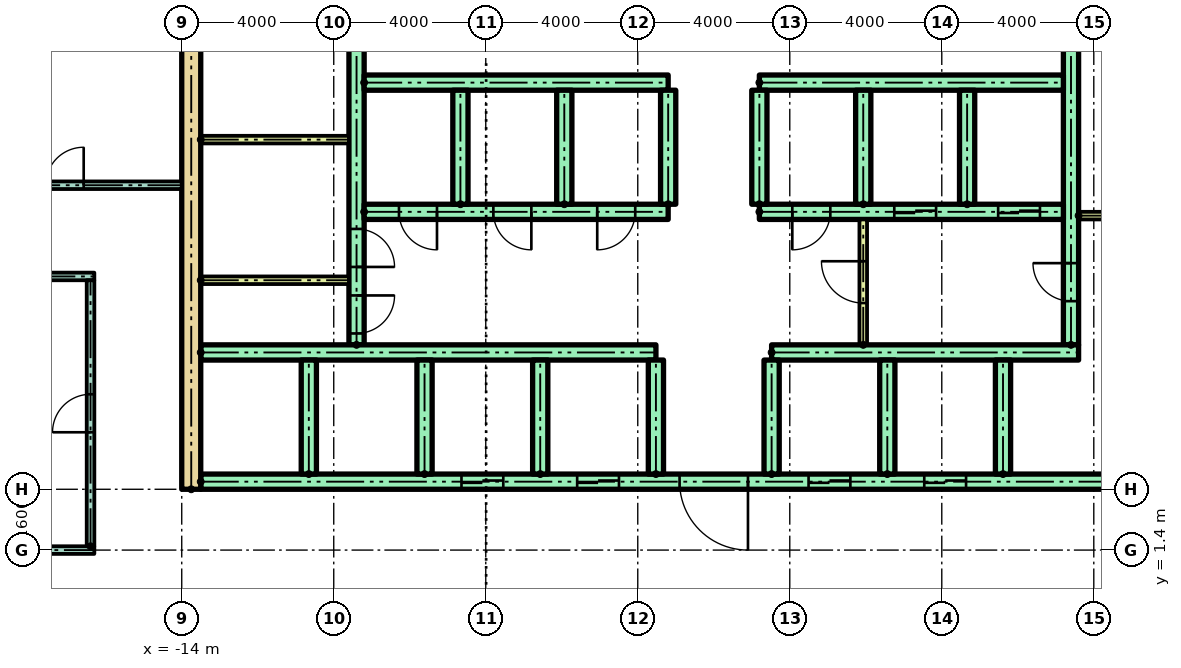
"""IFC4 building model, lengths in metres.
Left out: names, types, materials, properties, quantities, classifications, styles, units other than length and angle.
Written with IfcOpenShell. Run it as: python <this file> out.ifc"""

import sys

from ifc_helpers import new_model, si_unit, direction, frame, frame_2d, origin, place, context, subcontext, project, spatial, rectangle, extrude, element, fill, save


model = new_model("IFC4")
c1 = context("Model", 3, precision=1e-05, world=origin(), true_north=direction((0.0, 1.0)))
c2 = subcontext(c1, "Body", "Model", "MODEL_VIEW")
j1 = project(units=[si_unit("LENGTHUNIT", "METRE"), si_unit("PLANEANGLEUNIT", "RADIAN")], contexts=[c1])
p1 = place(None, origin())
s1 = spatial("IfcSite", under=j1, at=p1, CompositionType="ELEMENT")
p2 = place(p1, origin())
s2 = spatial("IfcBuilding", under=s1, at=p2, CompositionType="ELEMENT")
p3 = place(p2, frame((0.0, 0.0, 18.0)))
s3 = spatial("IfcBuildingStorey", under=s2, at=p3, CompositionType="ELEMENT", Elevation=18.0)
p4 = place(p3, frame((-13.75, 3.0, 0.0), z_axis=(0.0, 0.0, 1.0), x_axis=(0.0, 1.0, 0.0)))
e1 = element("IfcWall", 1, at=p4, inside=s3, PredefinedType="SHEAR", context=c2, shape_type="SweptSolid", body=[
    extrude(rectangle(XDim=17.0, YDim=0.5, at=frame_2d((8.5, 0.0))), origin(), (0.0, 0.0, 1.0), 3.7),
])
p5 = place(p3, frame((-9.4, 6.8, 0.0), z_axis=(0.0, 0.0, 1.0), x_axis=(0.0, 1.0, 0.0)))
e2 = element("IfcWall", 2, at=p5, inside=s3, PredefinedType="SHEAR", context=c2, shape_type="SweptSolid", body=[
    extrude(rectangle(XDim=12.7, YDim=0.4, at=frame_2d((6.35, 0.0))), origin(), (0.0, 0.0, 1.0), 3.7),
])
p6 = place(p5, frame((0.3, 0.0, 0.0)))
e3 = element("IfcOpeningElement", 3, at=p6, cuts=e2, PredefinedType="OPENING", context=c2, shape_type="SweptSolid", body=[
    extrude(rectangle(XDim=1.0, YDim=2.1, at=frame_2d((0.5, 1.05))), frame((0.0, 0.21, 0.0), z_axis=(0.0, -1.0, 0.0), x_axis=(1.0, 0.0, 0.0)), (0.0, 0.0, 1.0), 0.42),
])
p7 = place(p5, frame((2.05, 0.0, 0.0)))
e4 = element("IfcOpeningElement", 4, at=p7, cuts=e2, PredefinedType="OPENING", context=c2, shape_type="SweptSolid", body=[
    extrude(rectangle(XDim=1.0, YDim=2.1, at=frame_2d((0.5, 1.05))), frame((0.0, 0.21, 0.0), z_axis=(0.0, -1.0, 0.0), x_axis=(1.0, 0.0, 0.0)), (0.0, 0.0, 1.0), 0.42),
])
p8 = place(p5, frame((7.925, 0.0, 0.0)))
e5 = element("IfcOpeningElement", 5, at=p8, cuts=e2, PredefinedType="OPENING", context=c2, shape_type="SweptSolid", body=[
    extrude(rectangle(XDim=1.0, YDim=2.1, at=frame_2d((0.5, 1.05))), frame((0.0, 0.21, 0.0), z_axis=(0.0, -1.0, 0.0), x_axis=(1.0, 0.0, 0.0)), (0.0, 0.0, 1.0), 0.42),
])
p9 = place(p3, frame((9.4, 6.8, 0.0), z_axis=(0.0, 0.0, 1.0), x_axis=(0.0, 1.0, 0.0)))
e6 = element("IfcWall", 6, at=p9, inside=s3, PredefinedType="SHEAR", context=c2, shape_type="SweptSolid", body=[
    extrude(rectangle(XDim=12.7, YDim=0.4, at=frame_2d((6.35, 0.0))), origin(), (0.0, 0.0, 1.0), 3.7),
])
p10 = place(p9, frame((1.15, 0.0, 0.0)))
e7 = element("IfcOpeningElement", 7, at=p10, cuts=e6, PredefinedType="OPENING", context=c2, shape_type="SweptSolid", body=[
    extrude(rectangle(XDim=1.0, YDim=2.1, at=frame_2d((0.5, 1.05))), frame((0.0, 0.21, 0.0), z_axis=(0.0, -1.0, 0.0), x_axis=(1.0, 0.0, 0.0)), (0.0, 0.0, 1.0), 0.42),
])
p11 = place(p9, frame((7.925, 0.0, 0.0)))
e8 = element("IfcOpeningElement", 8, at=p11, cuts=e6, PredefinedType="OPENING", context=c2, shape_type="SweptSolid", body=[
    extrude(rectangle(XDim=1.0, YDim=2.1, at=frame_2d((0.5, 1.05))), frame((0.0, 0.21, 0.0), z_axis=(0.0, -1.0, 0.0), x_axis=(1.0, 0.0, 0.0)), (0.0, 0.0, 1.0), 0.42),
])
p12 = place(p3, frame((-13.5, 3.2, 0.0)))
e9 = element("IfcWall", 9, at=p12, inside=s3, PredefinedType="SHEAR", context=c2, shape_type="SweptSolid", body=[
    extrude(rectangle(XDim=27.0, YDim=0.4, at=frame_2d((13.5, 0.0))), origin(), (0.0, 0.0, 1.0), 3.7),
])
p13 = place(p12, frame((6.861, 0.0, 0.0)))
e10 = element("IfcOpeningElement", 10, at=p13, cuts=e9, PredefinedType="OPENING", context=c2, shape_type="SweptSolid", body=[
    extrude(rectangle(XDim=1.1, YDim=2.1, at=frame_2d((0.55, 1.05))), frame((0.0, 0.21, 0.0), z_axis=(0.0, -1.0, 0.0), x_axis=(1.0, 0.0, 0.0)), (0.0, 0.0, 1.0), 0.42),
])
p14 = place(p12, frame((9.906, 0.0, 0.0)))
e11 = element("IfcOpeningElement", 11, at=p14, cuts=e9, PredefinedType="OPENING", context=c2, shape_type="SweptSolid", body=[
    extrude(rectangle(XDim=1.1, YDim=2.1, at=frame_2d((0.55, 1.05))), frame((0.0, 0.21, 0.0), z_axis=(0.0, -1.0, 0.0), x_axis=(1.0, 0.0, 0.0)), (0.0, 0.0, 1.0), 0.42),
])
p15 = place(p12, frame((15.994, 0.0, 0.0)))
e12 = element("IfcOpeningElement", 12, at=p15, cuts=e9, PredefinedType="OPENING", context=c2, shape_type="SweptSolid", body=[
    extrude(rectangle(XDim=1.1, YDim=2.1, at=frame_2d((0.55, 1.05))), frame((0.0, 0.21, 0.0), z_axis=(0.0, -1.0, 0.0), x_axis=(1.0, 0.0, 0.0)), (0.0, 0.0, 1.0), 0.42),
])
p16 = place(p12, frame((19.039, 0.0, 0.0)))
e13 = element("IfcOpeningElement", 13, at=p16, cuts=e9, PredefinedType="OPENING", context=c2, shape_type="SweptSolid", body=[
    extrude(rectangle(XDim=1.1, YDim=2.1, at=frame_2d((0.55, 1.05))), frame((0.0, 0.21, 0.0), z_axis=(0.0, -1.0, 0.0), x_axis=(1.0, 0.0, 0.0)), (0.0, 0.0, 1.0), 0.42),
])
p17 = place(p12, frame((12.6, 0.0, 0.0)))
e14 = element("IfcOpeningElement", 14, at=p17, cuts=e9, PredefinedType="OPENING", context=c2, shape_type="SweptSolid", body=[
    extrude(rectangle(XDim=1.8, YDim=2.1, at=frame_2d((0.9, 1.05))), frame((0.0, 0.21, 0.0), z_axis=(0.0, -1.0, 0.0), x_axis=(1.0, 0.0, 0.0)), (0.0, 0.0, 1.0), 0.42),
])
p18 = place(p3, frame((-13.5, 6.6, 0.0)))
e15 = element("IfcWall", 15, at=p18, inside=s3, PredefinedType="SHEAR", context=c2, shape_type="SweptSolid", body=[
    extrude(rectangle(XDim=11.978, YDim=0.4, at=frame_2d((5.989, 0.0))), origin(), (0.0, 0.0, 1.0), 3.7),
])
p19 = place(p3, frame((1.522, 6.6, 0.0)))
e16 = element("IfcWall", 16, at=p19, inside=s3, PredefinedType="SHEAR", context=c2, shape_type="SweptSolid", body=[
    extrude(rectangle(XDim=8.078, YDim=0.4, at=frame_2d((4.039, 0.0))), origin(), (0.0, 0.0, 1.0), 3.7),
])
for number, where, z_axis, x_axis in (
    (17, (-10.656, 3.4, 0.0), (0.0, 0.0, 1.0), (0.0, 1.0, 0.0)),
    (18, (-7.611, 3.4, 0.0), (0.0, 0.0, 1.0), (0.0, 1.0, 0.0)),
    (19, (-4.567, 3.4, 0.0), (0.0, 0.0, 1.0), (0.0, 1.0, 0.0)),
    (20, (-1.522, 3.4, 0.0), (0.0, 0.0, 1.0), (0.0, 1.0, 0.0)),
    (21, (1.522, 3.4, 0.0), (0.0, 0.0, 1.0), (0.0, 1.0, 0.0)),
    (22, (4.567, 3.4, 0.0), (0.0, 0.0, 1.0), (0.0, 1.0, 0.0)),
    (23, (7.611, 3.4, 0.0), (0.0, 0.0, 1.0), (0.0, 1.0, 0.0)),
):
    element("IfcWall", number, at=place(p3, frame(where, z_axis=z_axis, x_axis=x_axis)), inside=s3, PredefinedType="SHEAR", context=c2, shape_type="SweptSolid", body=[
        extrude(rectangle(XDim=3.0, YDim=0.4, at=frame_2d((1.5, 0.0))), origin(), (0.0, 0.0, 1.0), 3.7),
    ])
p20 = place(p3, frame((-9.2, 10.3, 0.0)))
e24 = element("IfcWall", 24, at=p20, inside=s3, PredefinedType="SHEAR", context=c2, shape_type="SweptSolid", body=[
    extrude(rectangle(XDim=8.0, YDim=0.4, at=frame_2d((4.0, 0.0))), origin(), (0.0, 0.0, 1.0), 3.7),
])
p21 = place(p20, frame((0.917, 0.0, 0.0)))
e25 = element("IfcOpeningElement", 25, at=p21, cuts=e24, PredefinedType="OPENING", context=c2, shape_type="SweptSolid", body=[
    extrude(rectangle(XDim=1.0, YDim=2.1, at=frame_2d((0.5, 1.05))), frame((0.0, 0.21, 0.0), z_axis=(0.0, -1.0, 0.0), x_axis=(1.0, 0.0, 0.0)), (0.0, 0.0, 1.0), 0.42),
])
p22 = place(p20, frame((3.4, 0.0, 0.0)))
e26 = element("IfcOpeningElement", 26, at=p22, cuts=e24, PredefinedType="OPENING", context=c2, shape_type="SweptSolid", body=[
    extrude(rectangle(XDim=1.0, YDim=2.1, at=frame_2d((0.5, 1.05))), frame((0.0, 0.21, 0.0), z_axis=(0.0, -1.0, 0.0), x_axis=(1.0, 0.0, 0.0)), (0.0, 0.0, 1.0), 0.42),
])
p23 = place(p20, frame((6.133, 0.0, 0.0)))
e27 = element("IfcOpeningElement", 27, at=p23, cuts=e24, PredefinedType="OPENING", context=c2, shape_type="SweptSolid", body=[
    extrude(rectangle(XDim=1.0, YDim=2.1, at=frame_2d((0.5, 1.05))), frame((0.0, 0.21, 0.0), z_axis=(0.0, -1.0, 0.0), x_axis=(1.0, 0.0, 0.0)), (0.0, 0.0, 1.0), 0.42),
])
p24 = place(p3, frame((-9.2, 13.7, 0.0)))
e28 = element("IfcWall", 28, at=p24, inside=s3, PredefinedType="SHEAR", context=c2, shape_type="SweptSolid", body=[
    extrude(rectangle(XDim=8.0, YDim=0.4, at=frame_2d((4.0, 0.0))), origin(), (0.0, 0.0, 1.0), 3.7),
])
p25 = place(p3, frame((1.2, 10.3, 0.0)))
e29 = element("IfcWall", 29, at=p25, inside=s3, PredefinedType="SHEAR", context=c2, shape_type="SweptSolid", body=[
    extrude(rectangle(XDim=8.0, YDim=0.4, at=frame_2d((4.0, 0.0))), origin(), (0.0, 0.0, 1.0), 3.7),
])
p26 = place(p25, frame((3.55, 0.0, 0.0)))
e30 = element("IfcOpeningElement", 30, at=p26, cuts=e29, PredefinedType="OPENING", context=c2, shape_type="SweptSolid", body=[
    extrude(rectangle(XDim=1.1, YDim=2.1, at=frame_2d((0.55, 1.05))), frame((0.0, 0.21, 0.0), z_axis=(0.0, -1.0, 0.0), x_axis=(1.0, 0.0, 0.0)), (0.0, 0.0, 1.0), 0.42),
])
p27 = place(p25, frame((6.283, 0.0, 0.0)))
e31 = element("IfcOpeningElement", 31, at=p27, cuts=e29, PredefinedType="OPENING", context=c2, shape_type="SweptSolid", body=[
    extrude(rectangle(XDim=1.1, YDim=2.1, at=frame_2d((0.55, 1.05))), frame((0.0, 0.21, 0.0), z_axis=(0.0, -1.0, 0.0), x_axis=(1.0, 0.0, 0.0)), (0.0, 0.0, 1.0), 0.42),
])
p28 = place(p25, frame((0.867, 0.0, 0.0)))
e32 = element("IfcOpeningElement", 32, at=p28, cuts=e29, PredefinedType="OPENING", context=c2, shape_type="SweptSolid", body=[
    extrude(rectangle(XDim=1.0, YDim=2.1, at=frame_2d((0.5, 1.05))), frame((0.0, 0.21, 0.0), z_axis=(0.0, -1.0, 0.0), x_axis=(1.0, 0.0, 0.0)), (0.0, 0.0, 1.0), 0.42),
])
p29 = place(p3, frame((1.2, 13.7, 0.0)))
e33 = element("IfcWall", 33, at=p29, inside=s3, PredefinedType="SHEAR", context=c2, shape_type="SweptSolid", body=[
    extrude(rectangle(XDim=8.0, YDim=0.4, at=frame_2d((4.0, 0.0))), origin(), (0.0, 0.0, 1.0), 3.7),
])
for number, where, z_axis, x_axis in (
    (34, (-6.667, 10.5, 0.0), (0.0, 0.0, 1.0), (0.0, 1.0, 0.0)),
    (35, (-3.933, 10.5, 0.0), (0.0, 0.0, 1.0), (0.0, 1.0, 0.0)),
    (36, (-1.2, 10.5, 0.0), (0.0, 0.0, 1.0), (0.0, 1.0, 0.0)),
    (37, (1.2, 10.5, 0.0), (0.0, 0.0, 1.0), (0.0, 1.0, 0.0)),
    (38, (3.933, 10.5, 0.0), (0.0, 0.0, 1.0), (0.0, 1.0, 0.0)),
    (39, (6.667, 10.5, 0.0), (0.0, 0.0, 1.0), (0.0, 1.0, 0.0)),
):
    element("IfcWall", number, at=place(p3, frame(where, z_axis=z_axis, x_axis=x_axis)), inside=s3, PredefinedType="SHEAR", context=c2, shape_type="SweptSolid", body=[
        extrude(rectangle(XDim=3.0, YDim=0.4, at=frame_2d((1.5, 0.0))), origin(), (0.0, 0.0, 1.0), 3.7),
    ])
p30 = place(p3, frame((3.933, 6.8, 0.0), z_axis=(0.0, 0.0, 1.0), x_axis=(0.0, 1.0, 0.0)))
e40 = element("IfcWall", 40, at=p30, inside=s3, PredefinedType="PARTITIONING", context=c2, shape_type="SweptSolid", body=[
    extrude(rectangle(XDim=3.3, YDim=0.2, at=frame_2d((1.65, 0.0))), origin(), (0.0, 0.0, 1.0), 3.7),
])
p31 = place(p30, frame((1.1, 0.0, 0.0)))
e41 = element("IfcOpeningElement", 41, at=p31, cuts=e40, PredefinedType="OPENING", context=c2, shape_type="SweptSolid", body=[
    extrude(rectangle(XDim=1.1, YDim=2.1, at=frame_2d((0.55, 1.05))), frame((0.0, 0.11, 0.0), z_axis=(0.0, -1.0, 0.0), x_axis=(1.0, 0.0, 0.0)), (0.0, 0.0, 1.0), 0.22),
])
for number, where in (
    (42, (-13.5, 8.5, 0.0)),
    (43, (-13.5, 12.2, 0.0)),
    (44, (9.6, 10.2, 0.0)),
):
    element("IfcWall", number, at=place(p3, frame(where)), inside=s3, PredefinedType="PARTITIONING", context=c2, shape_type="SweptSolid", body=[
        extrude(rectangle(XDim=3.9, YDim=0.2, at=frame_2d((1.95, 0.0))), origin(), (0.0, 0.0, 1.0), 3.7),
    ])
p32 = place(p3, frame((-36.9, 1.4, 0.0)))
e45 = element("IfcWall", 45, at=p32, inside=s3, PredefinedType="PARTITIONING", context=c2, shape_type="SweptSolid", body=[
    extrude(rectangle(XDim=20.6, YDim=0.2, at=frame_2d((10.3, 0.0))), origin(), (0.0, 0.0, 1.0), 3.7),
])
p33 = place(p32, frame((1.3, 0.0, 0.0)))
e46 = element("IfcOpeningElement", 46, at=p33, cuts=e45, PredefinedType="OPENING", context=c2, shape_type="SweptSolid", body=[
    extrude(rectangle(XDim=1.0, YDim=2.1, at=frame_2d((0.5, 1.05))), frame((0.0, 0.11, 0.0), z_axis=(0.0, -1.0, 0.0), x_axis=(1.0, 0.0, 0.0)), (0.0, 0.0, 1.0), 0.22),
])
p34 = place(p32, frame((5.25, 0.0, 0.0)))
e47 = element("IfcOpeningElement", 47, at=p34, cuts=e45, PredefinedType="OPENING", context=c2, shape_type="SweptSolid", body=[
    extrude(rectangle(XDim=1.0, YDim=2.1, at=frame_2d((0.5, 1.05))), frame((0.0, 0.11, 0.0), z_axis=(0.0, -1.0, 0.0), x_axis=(1.0, 0.0, 0.0)), (0.0, 0.0, 1.0), 0.22),
])
p35 = place(p32, frame((10.0, 0.0, 0.0)))
e48 = element("IfcOpeningElement", 48, at=p35, cuts=e45, PredefinedType="OPENING", context=c2, shape_type="SweptSolid", body=[
    extrude(rectangle(XDim=1.0, YDim=2.1, at=frame_2d((0.5, 1.05))), frame((0.0, 0.11, 0.0), z_axis=(0.0, -1.0, 0.0), x_axis=(1.0, 0.0, 0.0)), (0.0, 0.0, 1.0), 0.22),
])
p36 = place(p32, frame((12.35, 0.0, 0.0)))
e49 = element("IfcOpeningElement", 49, at=p36, cuts=e45, PredefinedType="OPENING", context=c2, shape_type="SweptSolid", body=[
    extrude(rectangle(XDim=0.9, YDim=2.1, at=frame_2d((0.45, 1.05))), frame((0.0, 0.11, 0.0), z_axis=(0.0, -1.0, 0.0), x_axis=(1.0, 0.0, 0.0)), (0.0, 0.0, 1.0), 0.22),
])
p37 = place(p3, frame((-37.6, 8.6, 0.0)))
e50 = element("IfcWall", 50, at=p37, inside=s3, PredefinedType="PARTITIONING", context=c2, shape_type="SweptSolid", body=[
    extrude(rectangle(XDim=21.3, YDim=0.2, at=frame_2d((10.65, 0.0))), origin(), (0.0, 0.0, 1.0), 3.7),
])
p38 = place(p3, frame((-21.5, 11.0, 0.0)))
e51 = element("IfcWall", 51, at=p38, inside=s3, PredefinedType="PARTITIONING", context=c2, shape_type="SweptSolid", body=[
    extrude(rectangle(XDim=7.5, YDim=0.2, at=frame_2d((3.75, 0.0))), origin(), (0.0, 0.0, 1.0), 3.7),
])
p39 = place(p38, frame((0.35, 0.0, 0.0)))
e52 = element("IfcOpeningElement", 52, at=p39, cuts=e51, PredefinedType="OPENING", context=c2, shape_type="SweptSolid", body=[
    extrude(rectangle(XDim=1.0, YDim=2.1, at=frame_2d((0.5, 1.05))), frame((0.0, 0.11, 0.0), z_axis=(0.0, -1.0, 0.0), x_axis=(1.0, 0.0, 0.0)), (0.0, 0.0, 1.0), 0.22),
])
p40 = place(p38, frame((3.92, 0.0, 0.0)))
e53 = element("IfcOpeningElement", 53, at=p40, cuts=e51, PredefinedType="OPENING", context=c2, shape_type="SweptSolid", body=[
    extrude(rectangle(XDim=1.0, YDim=2.1, at=frame_2d((0.5, 1.05))), frame((0.0, 0.11, 0.0), z_axis=(0.0, -1.0, 0.0), x_axis=(1.0, 0.0, 0.0)), (0.0, 0.0, 1.0), 0.22),
])
p41 = place(p3, frame((-16.4, 1.5, 0.0), z_axis=(0.0, 0.0, 1.0), x_axis=(0.0, 1.0, 0.0)))
e54 = element("IfcWall", 54, at=p41, inside=s3, PredefinedType="PARTITIONING", context=c2, shape_type="SweptSolid", body=[
    extrude(rectangle(XDim=7.0, YDim=0.2, at=frame_2d((3.5, 0.0))), origin(), (0.0, 0.0, 1.0), 3.7),
])
p42 = place(p41, frame((3.0, 0.0, 0.0)))
e55 = element("IfcOpeningElement", 55, at=p42, cuts=e54, PredefinedType="OPENING", context=c2, shape_type="SweptSolid", body=[
    extrude(rectangle(XDim=1.0, YDim=2.1, at=frame_2d((0.5, 1.05))), frame((0.0, 0.11, 0.0), z_axis=(0.0, -1.0, 0.0), x_axis=(1.0, 0.0, 0.0)), (0.0, 0.0, 1.0), 0.22),
])
p43 = place(p13, origin())
e56 = element("IfcDoor", 56, at=p43, inside=s3, OperationType="SLIDING_TO_LEFT", PredefinedType="DOOR", context=c2, shape_type="SweptSolid", body=[
    extrude(rectangle(XDim=1.1, YDim=2.1, at=frame_2d((0.55, 1.05))), frame((0.0, 0.025, 0.0), z_axis=(0.0, -1.0, 0.0), x_axis=(1.0, 0.0, 0.0)), (0.0, 0.0, 1.0), 0.05),
])
fill(e10, e56)
p44 = place(p14, origin())
e57 = element("IfcDoor", 57, at=p44, inside=s3, OperationType="SLIDING_TO_LEFT", PredefinedType="DOOR", context=c2, shape_type="SweptSolid", body=[
    extrude(rectangle(XDim=1.1, YDim=2.1, at=frame_2d((0.55, 1.05))), frame((0.0, 0.025, 0.0), z_axis=(0.0, -1.0, 0.0), x_axis=(1.0, 0.0, 0.0)), (0.0, 0.0, 1.0), 0.05),
])
fill(e11, e57)
p45 = place(p15, origin())
e58 = element("IfcDoor", 58, at=p45, inside=s3, OperationType="SLIDING_TO_LEFT", PredefinedType="DOOR", context=c2, shape_type="SweptSolid", body=[
    extrude(rectangle(XDim=1.1, YDim=2.1, at=frame_2d((0.55, 1.05))), frame((0.0, 0.025, 0.0), z_axis=(0.0, -1.0, 0.0), x_axis=(1.0, 0.0, 0.0)), (0.0, 0.0, 1.0), 0.05),
])
fill(e12, e58)
p46 = place(p16, origin())
e59 = element("IfcDoor", 59, at=p46, inside=s3, OperationType="SLIDING_TO_LEFT", PredefinedType="DOOR", context=c2, shape_type="SweptSolid", body=[
    extrude(rectangle(XDim=1.1, YDim=2.1, at=frame_2d((0.55, 1.05))), frame((0.0, 0.025, 0.0), z_axis=(0.0, -1.0, 0.0), x_axis=(1.0, 0.0, 0.0)), (0.0, 0.0, 1.0), 0.05),
])
fill(e13, e59)
p47 = place(p17, frame((1.8, 0.0, 0.0), z_axis=(0.0, 0.0, 1.0), x_axis=(-1.0, 0.0, 0.0)))
e60 = element("IfcDoor", 60, at=p47, inside=s3, OperationType="DOUBLE_DOOR_SINGLE_SWING", PredefinedType="DOOR", context=c2, shape_type="SweptSolid", body=[
    extrude(rectangle(XDim=1.8, YDim=2.1, at=frame_2d((0.9, 1.05))), frame((0.0, 0.025, 0.0), z_axis=(0.0, -1.0, 0.0), x_axis=(1.0, 0.0, 0.0)), (0.0, 0.0, 1.0), 0.05),
])
fill(e14, e60)
p48 = place(p26, origin())
e61 = element("IfcDoor", 61, at=p48, inside=s3, OperationType="SLIDING_TO_LEFT", PredefinedType="DOOR", context=c2, shape_type="SweptSolid", body=[
    extrude(rectangle(XDim=1.1, YDim=2.1, at=frame_2d((0.55, 1.05))), frame((0.0, 0.025, 0.0), z_axis=(0.0, -1.0, 0.0), x_axis=(1.0, 0.0, 0.0)), (0.0, 0.0, 1.0), 0.05),
])
fill(e30, e61)
p49 = place(p27, origin())
e62 = element("IfcDoor", 62, at=p49, inside=s3, OperationType="SLIDING_TO_LEFT", PredefinedType="DOOR", context=c2, shape_type="SweptSolid", body=[
    extrude(rectangle(XDim=1.1, YDim=2.1, at=frame_2d((0.55, 1.05))), frame((0.0, 0.025, 0.0), z_axis=(0.0, -1.0, 0.0), x_axis=(1.0, 0.0, 0.0)), (0.0, 0.0, 1.0), 0.05),
])
fill(e31, e62)
p50 = place(p21, frame((1.0, 0.0, 0.0), z_axis=(0.0, 0.0, 1.0), x_axis=(-1.0, 0.0, 0.0)))
e63 = element("IfcDoor", 63, at=p50, inside=s3, OperationType="SINGLE_SWING_RIGHT", PredefinedType="DOOR", context=c2, shape_type="SweptSolid", body=[
    extrude(rectangle(XDim=1.0, YDim=2.1, at=frame_2d((0.5, 1.05))), frame((0.0, 0.025, 0.0), z_axis=(0.0, -1.0, 0.0), x_axis=(1.0, 0.0, 0.0)), (0.0, 0.0, 1.0), 0.05),
])
fill(e25, e63)
p51 = place(p22, frame((1.0, 0.0, 0.0), z_axis=(0.0, 0.0, 1.0), x_axis=(-1.0, 0.0, 0.0)))
e64 = element("IfcDoor", 64, at=p51, inside=s3, OperationType="SINGLE_SWING_RIGHT", PredefinedType="DOOR", context=c2, shape_type="SweptSolid", body=[
    extrude(rectangle(XDim=1.0, YDim=2.1, at=frame_2d((0.5, 1.05))), frame((0.0, 0.025, 0.0), z_axis=(0.0, -1.0, 0.0), x_axis=(1.0, 0.0, 0.0)), (0.0, 0.0, 1.0), 0.05),
])
fill(e26, e64)
p52 = place(p23, frame((1.0, 0.0, 0.0), z_axis=(0.0, 0.0, 1.0), x_axis=(-1.0, 0.0, 0.0)))
e65 = element("IfcDoor", 65, at=p52, inside=s3, OperationType="SINGLE_SWING_LEFT", PredefinedType="DOOR", context=c2, shape_type="SweptSolid", body=[
    extrude(rectangle(XDim=1.0, YDim=2.1, at=frame_2d((0.5, 1.05))), frame((0.0, 0.025, 0.0), z_axis=(0.0, -1.0, 0.0), x_axis=(1.0, 0.0, 0.0)), (0.0, 0.0, 1.0), 0.05),
])
fill(e27, e65)
p53 = place(p28, frame((1.0, 0.0, 0.0), z_axis=(0.0, 0.0, 1.0), x_axis=(-1.0, 0.0, 0.0)))
e66 = element("IfcDoor", 66, at=p53, inside=s3, OperationType="SINGLE_SWING_LEFT", PredefinedType="DOOR", context=c2, shape_type="SweptSolid", body=[
    extrude(rectangle(XDim=1.0, YDim=2.1, at=frame_2d((0.5, 1.05))), frame((0.0, 0.025, 0.0), z_axis=(0.0, -1.0, 0.0), x_axis=(1.0, 0.0, 0.0)), (0.0, 0.0, 1.0), 0.05),
])
fill(e32, e66)
p54 = place(p31, origin())
e67 = element("IfcDoor", 67, at=p54, inside=s3, OperationType="SINGLE_SWING_RIGHT", PredefinedType="DOOR", context=c2, shape_type="SweptSolid", body=[
    extrude(rectangle(XDim=1.1, YDim=2.1, at=frame_2d((0.55, 1.05))), frame((0.0, 0.025, 0.0), z_axis=(0.0, -1.0, 0.0), x_axis=(1.0, 0.0, 0.0)), (0.0, 0.0, 1.0), 0.05),
])
fill(e41, e67)
p55 = place(p6, frame((1.0, 0.0, 0.0), z_axis=(0.0, 0.0, 1.0), x_axis=(-1.0, 0.0, 0.0)))
e68 = element("IfcDoor", 68, at=p55, inside=s3, OperationType="SINGLE_SWING_RIGHT", PredefinedType="DOOR", context=c2, shape_type="SweptSolid", body=[
    extrude(rectangle(XDim=1.0, YDim=2.1, at=frame_2d((0.5, 1.05))), frame((0.0, 0.025, 0.0), z_axis=(0.0, -1.0, 0.0), x_axis=(1.0, 0.0, 0.0)), (0.0, 0.0, 1.0), 0.05),
])
fill(e3, e68)
p56 = place(p7, frame((1.0, 0.0, 0.0), z_axis=(0.0, 0.0, 1.0), x_axis=(-1.0, 0.0, 0.0)))
e69 = element("IfcDoor", 69, at=p56, inside=s3, OperationType="SINGLE_SWING_LEFT", PredefinedType="DOOR", context=c2, shape_type="SweptSolid", body=[
    extrude(rectangle(XDim=1.0, YDim=2.1, at=frame_2d((0.5, 1.05))), frame((0.0, 0.025, 0.0), z_axis=(0.0, -1.0, 0.0), x_axis=(1.0, 0.0, 0.0)), (0.0, 0.0, 1.0), 0.05),
])
fill(e4, e69)
p57 = place(p10, origin())
e70 = element("IfcDoor", 70, at=p57, inside=s3, OperationType="SINGLE_SWING_RIGHT", PredefinedType="DOOR", context=c2, shape_type="SweptSolid", body=[
    extrude(rectangle(XDim=1.0, YDim=2.1, at=frame_2d((0.5, 1.05))), frame((0.0, 0.025, 0.0), z_axis=(0.0, -1.0, 0.0), x_axis=(1.0, 0.0, 0.0)), (0.0, 0.0, 1.0), 0.05),
])
fill(e7, e70)
p58 = place(p42, origin())
e71 = element("IfcDoor", 71, at=p58, inside=s3, OperationType="SINGLE_SWING_LEFT", PredefinedType="DOOR", context=c2, shape_type="SweptSolid", body=[
    extrude(rectangle(XDim=1.0, YDim=2.1, at=frame_2d((0.5, 1.05))), frame((0.0, 0.025, 0.0), z_axis=(0.0, -1.0, 0.0), x_axis=(1.0, 0.0, 0.0)), (0.0, 0.0, 1.0), 0.05),
])
fill(e55, e71)
p59 = place(p40, origin())
e72 = element("IfcDoor", 72, at=p59, inside=s3, OperationType="SINGLE_SWING_RIGHT", PredefinedType="DOOR", context=c2, shape_type="SweptSolid", body=[
    extrude(rectangle(XDim=1.0, YDim=2.1, at=frame_2d((0.5, 1.05))), frame((0.0, 0.025, 0.0), z_axis=(0.0, -1.0, 0.0), x_axis=(1.0, 0.0, 0.0)), (0.0, 0.0, 1.0), 0.05),
])
fill(e53, e72)
save(model, sys.argv[1])
